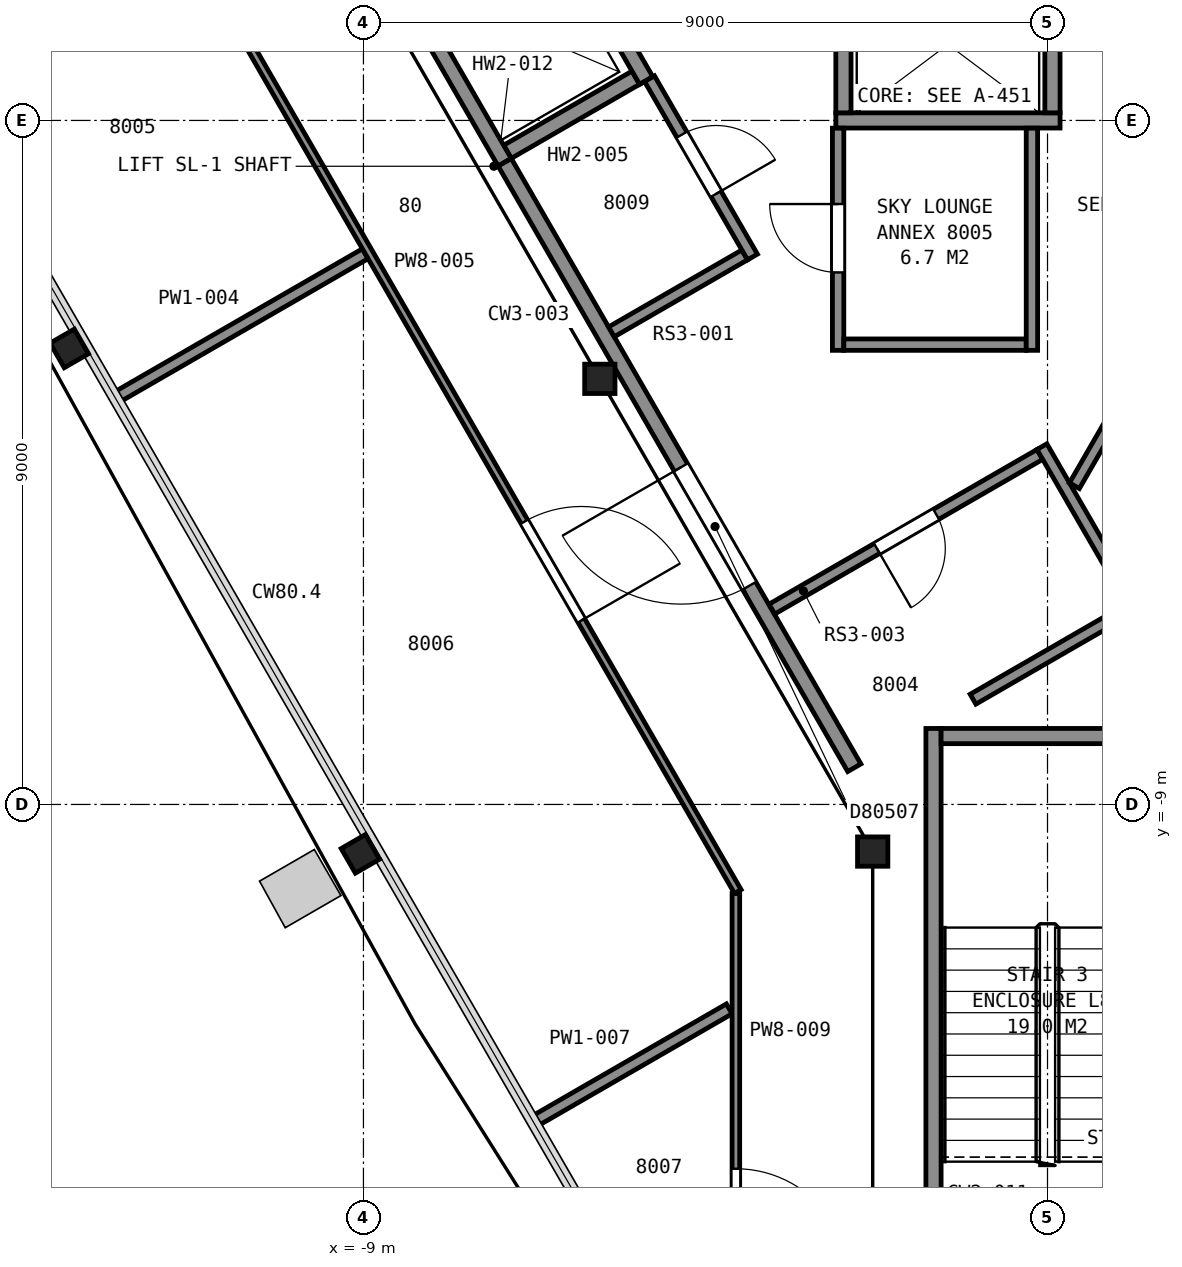
"""IFC4 building model, lengths in metres.
Left out: names, types, materials, properties, quantities, classifications, styles, units other than length and angle.
Written with IfcOpenShell. Run it as: python <this file> out.ifc"""

import sys

from ifc_helpers import new_model, si_unit, direction, frame, frame_2d, origin, origin_2d, place, context, subcontext, project, spatial, rectangle, i_section, extrude, element, fill, save


model = new_model("IFC4")
c1 = context("Model", 3, precision=1e-05, world=origin(), true_north=direction((0.0, 1.0)))
c2 = subcontext(c1, "Body", "Model", "MODEL_VIEW")
j1 = project(units=[si_unit("LENGTHUNIT", "METRE"), si_unit("PLANEANGLEUNIT", "RADIAN")], contexts=[c1])
p1 = place(None, origin())
s1 = spatial("IfcSite", under=j1, at=p1, CompositionType="ELEMENT")
p2 = place(p1, origin())
s2 = spatial("IfcBuilding", under=s1, at=p2, CompositionType="ELEMENT")
p3 = place(p2, frame((0.0, 0.0, 316.8)))
s3 = spatial("IfcBuildingStorey", under=s2, at=p3, CompositionType="ELEMENT", Elevation=316.8)
for number, where, z_axis, x_axis in (
    (1, (-12.87, -3.0, 0.0), (0.0, 0.0, 1.0), (-0.5, 0.866, 0.0)),
    (2, (-9.04, -9.65, 0.0), (0.0, 0.0, 1.0), (-0.5, 0.866, 0.0)),
):
    element("IfcColumn", number, at=place(p3, frame(where, z_axis=z_axis, x_axis=x_axis)), inside=s3, PredefinedType="COLUMN", context=c2, shape_type="SweptSolid", body=[
        extrude(i_section(OverallWidth=0.373, OverallDepth=0.368, WebThickness=0.015, FlangeThickness=0.024, FilletRadius=0.015, at=origin_2d()), origin(), (0.0, 0.0, 1.0), 4.2),
    ])
for number, where, z_axis, x_axis in (
    (3, (-5.89, -3.4, 0.0), (0.0, 0.0, 1.0), (1.0, 0.0, 0.0)),
    (4, (-2.3, -9.62, 0.0), (0.0, 0.0, 1.0), (1.0, 0.0, 0.0)),
):
    element("IfcColumn", number, at=place(p3, frame(where, z_axis=z_axis, x_axis=x_axis)), inside=s3, PredefinedType="COLUMN", context=c2, shape_type="SweptSolid", body=[
        extrude(i_section(OverallWidth=0.399, OverallDepth=0.386, WebThickness=0.021, FlangeThickness=0.033, FilletRadius=0.015, at=origin_2d()), origin(), (0.0, 0.0, 1.0), 4.2),
    ])
p4 = place(p3, frame((-1.5, -8.0, 0.0), z_axis=(0.0, 0.0, 1.0), x_axis=(0.0, -1.0, 0.0)))
e5 = element("IfcWall", 5, at=p4, inside=s3, PredefinedType="PARTITIONING", context=c2, shape_type="SweptSolid", body=[
    extrude(rectangle(XDim=7.2, YDim=0.2, at=frame_2d((3.6, 0.0))), origin(), (0.0, 0.0, 1.0), 3.95),
])
p5 = place(p3, frame((-1.4, -8.1, 0.0), z_axis=(0.0, 0.0, 1.0), x_axis=(1.0, 0.0, 0.0)))
e6 = element("IfcWall", 6, at=p5, inside=s3, PredefinedType="PARTITIONING", context=c2, shape_type="SweptSolid", body=[
    extrude(rectangle(XDim=2.8, YDim=0.2, at=frame_2d((1.4, 0.0))), origin(), (0.0, 0.0, 1.0), 3.95),
])
p6 = place(p3, frame((-2.785, 0.0, 0.0), z_axis=(0.0, 0.0, 1.0), x_axis=(1.0, 0.0, 0.0)))
e7 = element("IfcWall", 7, at=p6, inside=s3, PredefinedType="PARTITIONING", context=c2, shape_type="SweptSolid", body=[
    extrude(rectangle(XDim=2.95, YDim=0.2, at=frame_2d((1.475, 0.0))), origin(), (0.0, 0.0, 1.0), 4.2),
])
for number, where, z_axis, x_axis in (
    (8, (-7.105, -0.413, 0.0), (0.0, 0.0, 1.0), (0.866, 0.5, 0.0)),
    (9, (0.065, 0.1, 0.0), (0.0, 0.0, 1.0), (0.0, 1.0, 0.0)),
    (10, (-2.685, 0.1, 0.0), (0.0, 0.0, 1.0), (0.0, 1.0, 0.0)),
):
    element("IfcWall", number, at=place(p3, frame(where, z_axis=z_axis, x_axis=x_axis)), inside=s3, PredefinedType="PARTITIONING", context=c2, shape_type="SweptSolid", body=[
        extrude(rectangle(XDim=1.95, YDim=0.2, at=frame_2d((0.975, 0.0))), origin(), (0.0, 0.0, 1.0), 4.2),
    ])
p7 = place(p3, frame((-5.28, 0.525, 0.0), z_axis=(0.0, 0.0, 1.0), x_axis=(-0.500037662692, 0.866003658127, 0.0)))
e11 = element("IfcWall", 11, at=p7, inside=s3, PredefinedType="PARTITIONING", context=c2, shape_type="SweptSolid", body=[
    extrude(rectangle(XDim=2.95, YDim=0.2, at=frame_2d((1.475, 0.0))), origin(), (0.0, 0.0, 1.0), 4.2),
])
p8 = place(p7, frame((0.925, 0.0, 0.0)))
e12 = element("IfcOpeningElement", 12, at=p8, cuts=e11, PredefinedType="OPENING", context=c2, shape_type="SweptSolid", body=[
    extrude(rectangle(XDim=1.1, YDim=2.1, at=frame_2d((0.55, 1.05))), frame((0.0, 0.11, 0.0), z_axis=(0.0, -1.0, 0.0), x_axis=(1.0, 0.0, 0.0)), (0.0, 0.0, 1.0), 0.22),
])
p9 = place(p3, frame((-7.142, -0.55, 0.0), z_axis=(0.0, 0.0, 1.0), x_axis=(-0.49997559174, 0.866039495442, 0.0)))
e13 = element("IfcWall", 13, at=p9, inside=s3, PredefinedType="PARTITIONING", context=c2, shape_type="SweptSolid", body=[
    extrude(rectangle(XDim=2.95, YDim=0.2, at=frame_2d((1.475, 0.0))), origin(), (0.0, 0.0, 1.0), 4.2),
])
p10 = place(p3, frame((-7.141, -0.551, 0.0), z_axis=(0.0, 0.0, 1.0), x_axis=(0.499992795234, -0.866029563418, 0.0)))
e14 = element("IfcWall", 14, at=p10, inside=s3, PredefinedType="PARTITIONING", context=c2, shape_type="SweptSolid", body=[
    extrude(rectangle(XDim=9.198, YDim=0.2, at=frame_2d((4.599, 0.0))), origin(), (0.0, 0.0, 1.0), 3.95),
])
p11 = place(p10, frame((4.634, 0.0, 0.0)))
e15 = element("IfcOpeningElement", 15, at=p11, cuts=e14, PredefinedType="OPENING", context=c2, shape_type="SweptSolid", body=[
    extrude(rectangle(XDim=1.8, YDim=2.1, at=frame_2d((0.9, 1.05))), frame((0.0, 0.11, 0.0), z_axis=(0.0, -1.0, 0.0), x_axis=(1.0, 0.0, 0.0)), (0.0, 0.0, 1.0), 0.22),
])
p12 = place(p3, frame((-5.737, -2.782, 0.0), z_axis=(0.0, 0.0, 1.0), x_axis=(0.866000843773, 0.500042536776, 0.0)))
e16 = element("IfcWall", 16, at=p12, inside=s3, PredefinedType="PARTITIONING", context=c2, shape_type="SweptSolid", body=[
    extrude(rectangle(XDim=2.025, YDim=0.15, at=frame_2d((1.012, 0.0))), origin(), (0.0, 0.0, 1.0), 3.95),
])
p13 = place(p3, frame((-3.882, -1.797, 0.0), z_axis=(0.0, 0.0, 1.0), x_axis=(-0.500016307898, 0.86601598821, 0.0)))
e17 = element("IfcWall", 17, at=p13, inside=s3, PredefinedType="PARTITIONING", context=c2, shape_type="SweptSolid", body=[
    extrude(rectangle(XDim=2.709, YDim=0.15, at=frame_2d((1.354, 0.0))), origin(), (0.0, 0.0, 1.0), 3.95),
])
p14 = place(p13, frame((0.959, 0.0, 0.0)))
e18 = element("IfcOpeningElement", 18, at=p14, cuts=e17, PredefinedType="OPENING", context=c2, shape_type="SweptSolid", body=[
    extrude(rectangle(XDim=0.9, YDim=2.1, at=frame_2d((0.45, 1.05))), frame((0.0, 0.085, 0.0), z_axis=(0.0, -1.0, 0.0), x_axis=(1.0, 0.0, 0.0)), (0.0, 0.0, 1.0), 0.17),
])
p15 = place(p3, frame((-0.101, -4.395, 0.0), z_axis=(0.0, 0.0, 1.0), x_axis=(-0.866045745349, -0.499964765721, 0.0)))
e19 = element("IfcWall", 19, at=p15, inside=s3, PredefinedType="PARTITIONING", context=c2, shape_type="SweptSolid", body=[
    extrude(rectangle(XDim=4.07, YDim=0.15, at=frame_2d((2.035, 0.0))), origin(), (0.0, 0.0, 1.0), 3.95),
])
p16 = place(p15, frame((1.575, 0.0, 0.0)))
e20 = element("IfcOpeningElement", 20, at=p16, cuts=e19, PredefinedType="OPENING", context=c2, shape_type="SweptSolid", body=[
    extrude(rectangle(XDim=0.9, YDim=2.1, at=frame_2d((0.45, 1.05))), frame((0.0, 0.085, 0.0), z_axis=(0.0, -1.0, 0.0), x_axis=(1.0, 0.0, 0.0)), (0.0, 0.0, 1.0), 0.17),
])
p17 = place(p3, frame((-2.755, -0.102, 0.0), z_axis=(0.0, 0.0, 1.0), x_axis=(0.0, -1.0, 0.0)))
e21 = element("IfcWall", 21, at=p17, inside=s3, PredefinedType="PARTITIONING", context=c2, shape_type="SweptSolid", body=[
    extrude(rectangle(XDim=2.923, YDim=0.15, at=frame_2d((1.461, 0.0))), origin(), (0.0, 0.0, 1.0), 3.95),
])
p18 = place(p17, frame((0.998, 0.0, 0.0)))
e22 = element("IfcOpeningElement", 22, at=p18, cuts=e21, PredefinedType="OPENING", context=c2, shape_type="SweptSolid", body=[
    extrude(rectangle(XDim=0.9, YDim=2.1, at=frame_2d((0.45, 1.05))), frame((0.0, 0.085, 0.0), z_axis=(0.0, -1.0, 0.0), x_axis=(1.0, 0.0, 0.0)), (0.0, 0.0, 1.0), 0.17),
])
p19 = place(p3, frame((-2.68, -2.95, 0.0), z_axis=(0.0, 0.0, 1.0), x_axis=(1.0, 0.0, 0.0)))
e23 = element("IfcWall", 23, at=p19, inside=s3, PredefinedType="PARTITIONING", context=c2, shape_type="SweptSolid", body=[
    extrude(rectangle(XDim=2.4, YDim=0.15, at=frame_2d((1.2, 0.0))), origin(), (0.0, 0.0, 1.0), 3.95),
])
p20 = place(p3, frame((-0.98, -7.615, 0.0), z_axis=(0.0, 0.0, 1.0), x_axis=(0.866081021932, 0.499903654166, 0.0)))
e24 = element("IfcWall", 24, at=p20, inside=s3, PredefinedType="PARTITIONING", context=c2, shape_type="SweptSolid", body=[
    extrude(rectangle(XDim=2.372, YDim=0.15, at=frame_2d((1.186, 0.0))), origin(), (0.0, 0.0, 1.0), 3.95),
])
p21 = place(p3, frame((-0.205, -3.025, 0.0), z_axis=(0.0, 0.0, 1.0), x_axis=(0.0, 1.0, 0.0)))
e25 = element("IfcWall", 25, at=p21, inside=s3, PredefinedType="PARTITIONING", context=c2, shape_type="SweptSolid", body=[
    extrude(rectangle(XDim=2.923, YDim=0.15, at=frame_2d((1.461, 0.0))), origin(), (0.0, 0.0, 1.0), 3.95),
])
p22 = place(p3, frame((-0.073, -4.292, 0.0), z_axis=(0.0, 0.0, 1.0), x_axis=(0.500004234368, -0.866022959057, 0.0)))
e26 = element("IfcWall", 26, at=p22, inside=s3, PredefinedType="PARTITIONING", context=c2, shape_type="SweptSolid", body=[
    extrude(rectangle(XDim=2.5, YDim=0.15, at=frame_2d((1.25, 0.0))), origin(), (0.0, 0.0, 1.0), 3.95),
])
p23 = place(p3, frame((0.354, -4.806, 0.0), z_axis=(0.0, 0.0, 1.0), x_axis=(0.499804398801, 0.866138304741, 0.0)))
e27 = element("IfcWall", 27, at=p23, inside=s3, PredefinedType="PARTITIONING", context=c2, shape_type="SweptSolid", body=[
    extrude(rectangle(XDim=1.375, YDim=0.15, at=frame_2d((0.688, 0.0))), origin(), (0.0, 0.0, 1.0), 3.95),
])
p24 = place(p3, frame((-12.252, -3.645, 0.0), z_axis=(0.0, 0.0, 1.0), x_axis=(0.866034027923, 0.499985062256, 0.0)))
e28 = element("IfcWall", 28, at=p24, inside=s3, PredefinedType="PARTITIONING", context=c2, shape_type="SweptSolid", body=[
    extrude(rectangle(XDim=3.782, YDim=0.15, at=frame_2d((1.891, 0.0))), origin(), (0.0, 0.0, 1.0), 3.297),
])
p25 = place(p3, frame((-4.075, -10.145, 0.0), z_axis=(0.0, 0.0, 1.0), x_axis=(-0.499912942625, 0.866075660549, 0.0)))
e29 = element("IfcWall", 29, at=p25, inside=s3, PredefinedType="PARTITIONING", context=c2, shape_type="SweptSolid", body=[
    extrude(rectangle(XDim=13.499, YDim=0.1, at=frame_2d((6.749, 0.0))), origin(), (0.0, 0.0, 1.0), 3.297),
])
p26 = place(p25, frame((4.117, 0.0, 0.0)))
e30 = element("IfcOpeningElement", 30, at=p26, cuts=e29, PredefinedType="OPENING", context=c2, shape_type="SweptSolid", body=[
    extrude(rectangle(XDim=1.5, YDim=2.1, at=frame_2d((0.75, 1.05))), frame((0.0, 0.06, 0.0), z_axis=(0.0, -1.0, 0.0), x_axis=(1.0, 0.0, 0.0)), (0.0, 0.0, 1.0), 0.12),
])
p27 = place(p3, frame((-6.753, -13.17, 0.0), z_axis=(0.0, 0.0, 1.0), x_axis=(0.866125201583, 0.499827105291, 0.0)))
e31 = element("IfcWall", 31, at=p27, inside=s3, PredefinedType="PARTITIONING", context=c2, shape_type="SweptSolid", body=[
    extrude(rectangle(XDim=2.962, YDim=0.15, at=frame_2d((1.481, 0.0))), origin(), (0.0, 0.0, 1.0), 3.297),
])
p28 = place(p3, frame((-4.1, -17.68, 0.0), z_axis=(0.0, 0.0, 1.0), x_axis=(0.0, 1.0, 0.0)))
e32 = element("IfcWall", 32, at=p28, inside=s3, PredefinedType="PARTITIONING", context=c2, shape_type="SweptSolid", body=[
    extrude(rectangle(XDim=7.508, YDim=0.1, at=frame_2d((3.754, 0.0))), origin(), (0.0, 0.0, 1.0), 3.297),
])
p29 = place(p28, frame((2.387, 0.0, 0.0)))
e33 = element("IfcOpeningElement", 33, at=p29, cuts=e32, PredefinedType="OPENING", context=c2, shape_type="SweptSolid", body=[
    extrude(rectangle(XDim=1.5, YDim=2.1, at=frame_2d((0.75, 1.05))), frame((0.0, 0.06, 0.0), z_axis=(0.0, -1.0, 0.0), x_axis=(1.0, 0.0, 0.0)), (0.0, 0.0, 1.0), 0.12),
])
p30 = place(p11, origin())
e34 = element("IfcDoor", 34, at=p30, inside=s3, OperationType="DOUBLE_DOOR_SINGLE_SWING", PredefinedType="DOOR", context=c2, shape_type="SweptSolid", body=[
    extrude(rectangle(XDim=1.8, YDim=2.1, at=frame_2d((0.9, 1.05))), frame((0.0, 0.025, 0.0), z_axis=(0.0, -1.0, 0.0), x_axis=(1.0, 0.0, 0.0)), (0.0, 0.0, 1.0), 0.05),
])
fill(e15, e34)
p31 = place(p14, origin())
e35 = element("IfcDoor", 35, at=p31, inside=s3, OperationType="SINGLE_SWING_LEFT", PredefinedType="DOOR", context=c2, shape_type="SweptSolid", body=[
    extrude(rectangle(XDim=0.9, YDim=2.1, at=frame_2d((0.45, 1.05))), frame((0.0, 0.025, 0.0), z_axis=(0.0, -1.0, 0.0), x_axis=(1.0, 0.0, 0.0)), (0.0, 0.0, 1.0), 0.05),
])
fill(e18, e35)
p32 = place(p16, origin())
e36 = element("IfcDoor", 36, at=p32, inside=s3, OperationType="SINGLE_SWING_RIGHT", PredefinedType="DOOR", context=c2, shape_type="SweptSolid", body=[
    extrude(rectangle(XDim=0.9, YDim=2.1, at=frame_2d((0.45, 1.05))), frame((0.0, 0.025, 0.0), z_axis=(0.0, -1.0, 0.0), x_axis=(1.0, 0.0, 0.0)), (0.0, 0.0, 1.0), 0.05),
])
fill(e20, e36)
p33 = place(p18, origin())
e37 = element("IfcDoor", 37, at=p33, inside=s3, OperationType="SINGLE_SWING_LEFT", PredefinedType="DOOR", context=c2, shape_type="SweptSolid", body=[
    extrude(rectangle(XDim=0.9, YDim=2.1, at=frame_2d((0.45, 1.05))), frame((0.0, 0.025, 0.0), z_axis=(0.0, -1.0, 0.0), x_axis=(1.0, 0.0, 0.0)), (0.0, 0.0, 1.0), 0.05),
])
fill(e22, e37)
p34 = place(p26, origin())
e38 = element("IfcDoor", 38, at=p34, inside=s3, OperationType="DOUBLE_DOOR_SINGLE_SWING", PredefinedType="DOOR", context=c2, shape_type="SweptSolid", body=[
    extrude(rectangle(XDim=1.5, YDim=2.1, at=frame_2d((0.75, 1.05))), frame((0.0, 0.025, 0.0), z_axis=(0.0, -1.0, 0.0), x_axis=(1.0, 0.0, 0.0)), (0.0, 0.0, 1.0), 0.05),
])
fill(e30, e38)
p35 = place(p29, origin())
e39 = element("IfcDoor", 39, at=p35, inside=s3, OperationType="DOUBLE_DOOR_SINGLE_SWING", PredefinedType="DOOR", context=c2, shape_type="SweptSolid", body=[
    extrude(rectangle(XDim=1.5, YDim=2.1, at=frame_2d((0.75, 1.05))), frame((0.0, 0.025, 0.0), z_axis=(0.0, -1.0, 0.0), x_axis=(1.0, 0.0, 0.0)), (0.0, 0.0, 1.0), 0.05),
])
fill(e33, e39)
save(model, sys.argv[1])
